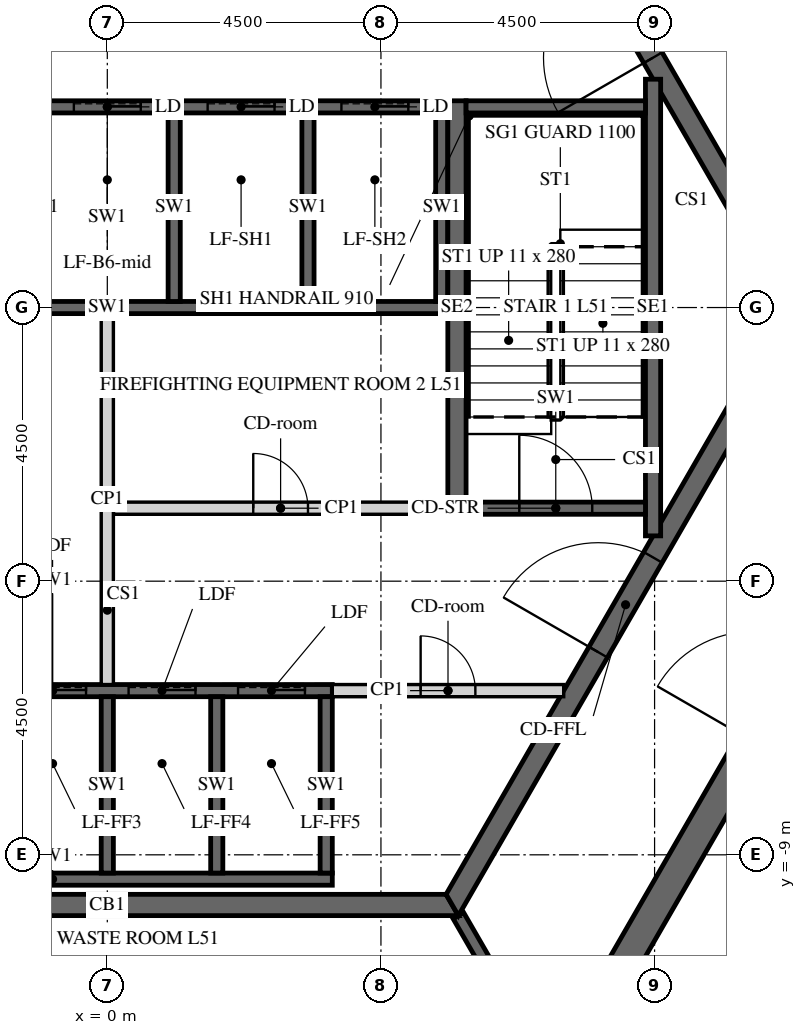
"""IFC4 building model, lengths in metres.
Left out: names, types, materials, properties, quantities, classifications, styles, units other than length and angle.
Written with IfcOpenShell. Run it as: python <this file> out.ifc"""

import sys

from ifc_helpers import new_model, si_unit, direction, frame, frame_2d, origin, place, context, subcontext, project, spatial, polyline, rectangle, outline, extrude, element, fill, save


model = new_model("IFC4")
c1 = context("Model", 3, precision=1e-05, world=origin(), true_north=direction((0.0, 1.0)))
c2 = subcontext(c1, "Body", "Model", "MODEL_VIEW")
j1 = project(units=[si_unit("LENGTHUNIT", "METRE"), si_unit("PLANEANGLEUNIT", "RADIAN")], contexts=[c1])
p1 = place(None, origin())
s1 = spatial("IfcSite", under=j1, at=p1, CompositionType="ELEMENT")
p2 = place(p1, origin())
s2 = spatial("IfcBuilding", under=s1, at=p2, CompositionType="ELEMENT")
p3 = place(p2, frame((0.0, 0.0, 215.1)))
s3 = spatial("IfcBuildingStorey", under=s2, at=p3, CompositionType="ELEMENT", Elevation=215.1)
p4 = place(p3, frame((7.361, -12.75, -0.15), z_axis=(0.0, 0.0, 1.0), x_axis=(0.50000571537, 0.866022103989, 0.0)))
e1 = element("IfcWall", 1, at=p4, inside=s3, PredefinedType="SHEAR", context=c2, shape_type="SweptSolid", body=[
    extrude(outline(polyline([(-0.144, -0.25), (14.867, -0.25), (14.578, 0.25), (0.144, 0.25), (-0.144, -0.25)])), origin(), (0.0, 0.0, 1.0), 3.9),
])
p5 = place(p4, frame((6.49, 0.0, 0.15)))
e2 = element("IfcOpeningElement", 2, at=p5, cuts=e1, PredefinedType="OPENING", context=c2, shape_type="SweptSolid", body=[
    extrude(rectangle(XDim=1.8, YDim=2.4, at=frame_2d((0.9, 1.2))), frame((0.0, 0.26, 0.0), z_axis=(0.0, -1.0, 0.0), x_axis=(1.0, 0.0, 0.0)), (0.0, 0.0, 1.0), 0.52),
])
p6 = place(p3, frame((14.722, 0.0, -0.15), z_axis=(0.0, 0.0, 1.0), x_axis=(-0.50000571537, 0.866022103989, 0.0)))
e3 = element("IfcWall", 3, at=p6, inside=s3, PredefinedType="SHEAR", context=c2, shape_type="SweptSolid", body=[
    extrude(outline(polyline([(-0.144, -0.25), (14.867, -0.25), (14.578, 0.25), (0.144, 0.25), (-0.144, -0.25)])), origin(), (0.0, 0.0, 1.0), 3.9),
])
p7 = place(p6, frame((6.432, 0.0, 0.15)))
e4 = element("IfcOpeningElement", 4, at=p7, cuts=e3, PredefinedType="OPENING", context=c2, shape_type="SweptSolid", body=[
    extrude(rectangle(XDim=1.8, YDim=2.4, at=frame_2d((0.9, 1.2))), frame((0.0, 0.26, 0.0), z_axis=(0.0, -1.0, 0.0), x_axis=(1.0, 0.0, 0.0)), (0.0, 0.0, 1.0), 0.52),
])
p8 = place(p3, frame((-5.673, -9.825, -0.15), z_axis=(0.0, 0.0, 1.0), x_axis=(1.0, 0.0, 0.0)))
e5 = element("IfcWall", 5, at=p8, inside=s3, PredefinedType="SHEAR", context=c2, shape_type="SweptSolid", body=[
    extrude(outline(polyline([(-0.101, -0.175), (11.446, -0.175), (11.244, 0.175), (0.101, 0.175), (-0.101, -0.175)])), origin(), (0.0, 0.0, 1.0), 3.9),
])
p9 = place(p3, frame((5.673, -9.825, -0.15), z_axis=(0.0, 0.0, 1.0), x_axis=(0.499995046907, 0.866028263435, 0.0)))
e6 = element("IfcWall", 6, at=p9, inside=s3, PredefinedType="SHEAR", context=c2, shape_type="SweptSolid", body=[
    extrude(outline(polyline([(-0.101, -0.175), (11.446, -0.175), (11.244, 0.175), (0.101, 0.175), (-0.101, -0.175)])), origin(), (0.0, 0.0, 1.0), 3.9),
])
p10 = place(p9, frame((4.801, 0.0, 0.15)))
e7 = element("IfcOpeningElement", 7, at=p10, cuts=e6, PredefinedType="OPENING", context=c2, shape_type="SweptSolid", body=[
    extrude(rectangle(XDim=1.8, YDim=2.4, at=frame_2d((0.9, 1.2))), frame((0.0, 0.185, 0.0), z_axis=(0.0, -1.0, 0.0), x_axis=(1.0, 0.0, 0.0)), (0.0, 0.0, 1.0), 0.37),
])
p11 = place(p3, frame((11.345, 0.0, -0.15), z_axis=(0.0, 0.0, 1.0), x_axis=(-0.499995046907, 0.866028263435, 0.0)))
e8 = element("IfcWall", 8, at=p11, inside=s3, PredefinedType="SHEAR", context=c2, shape_type="SweptSolid", body=[
    extrude(outline(polyline([(-0.101, -0.175), (11.446, -0.175), (11.244, 0.175), (0.101, 0.175), (-0.101, -0.175)])), origin(), (0.0, 0.0, 1.0), 3.9),
])
p12 = place(p11, frame((4.744, 0.0, 0.15)))
e9 = element("IfcOpeningElement", 9, at=p12, cuts=e8, PredefinedType="OPENING", context=c2, shape_type="SweptSolid", body=[
    extrude(rectangle(XDim=1.8, YDim=2.4, at=frame_2d((0.9, 1.2))), frame((0.0, 0.185, 0.0), z_axis=(0.0, -1.0, 0.0), x_axis=(1.0, 0.0, 0.0)), (0.0, 0.0, 1.0), 0.37),
])
p13 = place(p3, frame((-5.6, 3.3, -0.25), z_axis=(0.0, 0.0, 1.0), x_axis=(1.0, 0.0, 0.0)))
e10 = element("IfcWall", 10, at=p13, inside=s3, PredefinedType="SHEAR", context=c2, shape_type="SweptSolid", body=[
    extrude(rectangle(XDim=11.2, YDim=0.2, at=frame_2d((5.6, 0.0))), origin(), (0.0, 0.0, 1.0), 3.9),
])
p14 = place(p13, frame((0.65, 0.0, 0.25)))
e11 = element("IfcOpeningElement", 11, at=p14, cuts=e10, PredefinedType="OPENING", context=c2, shape_type="SweptSolid", body=[
    extrude(rectangle(XDim=1.1, YDim=2.1, at=frame_2d((0.55, 1.05))), frame((0.0, 0.11, 0.0), z_axis=(0.0, -1.0, 0.0), x_axis=(1.0, 0.0, 0.0)), (0.0, 0.0, 1.0), 0.22),
])
p15 = place(p13, frame((2.85, 0.0, 0.25)))
e12 = element("IfcOpeningElement", 12, at=p15, cuts=e10, PredefinedType="OPENING", context=c2, shape_type="SweptSolid", body=[
    extrude(rectangle(XDim=1.1, YDim=2.1, at=frame_2d((0.55, 1.05))), frame((0.0, 0.11, 0.0), z_axis=(0.0, -1.0, 0.0), x_axis=(1.0, 0.0, 0.0)), (0.0, 0.0, 1.0), 0.22),
])
p16 = place(p13, frame((5.05, 0.0, 0.25)))
e13 = element("IfcOpeningElement", 13, at=p16, cuts=e10, PredefinedType="OPENING", context=c2, shape_type="SweptSolid", body=[
    extrude(rectangle(XDim=1.1, YDim=2.1, at=frame_2d((0.55, 1.05))), frame((0.0, 0.11, 0.0), z_axis=(0.0, -1.0, 0.0), x_axis=(1.0, 0.0, 0.0)), (0.0, 0.0, 1.0), 0.22),
])
p17 = place(p13, frame((7.25, 0.0, 0.25)))
e14 = element("IfcOpeningElement", 14, at=p17, cuts=e10, PredefinedType="OPENING", context=c2, shape_type="SweptSolid", body=[
    extrude(rectangle(XDim=1.1, YDim=2.1, at=frame_2d((0.55, 1.05))), frame((0.0, 0.11, 0.0), z_axis=(0.0, -1.0, 0.0), x_axis=(1.0, 0.0, 0.0)), (0.0, 0.0, 1.0), 0.22),
])
p18 = place(p13, frame((9.45, 0.0, 0.25)))
e15 = element("IfcOpeningElement", 15, at=p18, cuts=e10, PredefinedType="OPENING", context=c2, shape_type="SweptSolid", body=[
    extrude(rectangle(XDim=1.1, YDim=2.1, at=frame_2d((0.55, 1.05))), frame((0.0, 0.11, 0.0), z_axis=(0.0, -1.0, 0.0), x_axis=(1.0, 0.0, 0.0)), (0.0, 0.0, 1.0), 0.22),
])
p19 = place(p3, frame((-5.6, 0.0, -0.25), z_axis=(0.0, 0.0, 1.0), x_axis=(1.0, 0.0, 0.0)))
e16 = element("IfcWall", 16, at=p19, inside=s3, PredefinedType="SHEAR", context=c2, shape_type="SweptSolid", body=[
    extrude(rectangle(XDim=11.2, YDim=0.2, at=frame_2d((5.6, 0.0))), origin(), (0.0, 0.0, 1.0), 3.9),
])
for number, where, z_axis, x_axis in (
    (17, (1.1, 0.1, -0.25), (0.0, 0.0, 1.0), (0.0, 1.0, 0.0)),
    (18, (3.3, 0.1, -0.25), (0.0, 0.0, 1.0), (0.0, 1.0, 0.0)),
    (19, (5.5, 0.1, -0.25), (0.0, 0.0, 1.0), (0.0, 1.0, 0.0)),
):
    element("IfcWall", number, at=place(p3, frame(where, z_axis=z_axis, x_axis=x_axis)), inside=s3, PredefinedType="SHEAR", context=c2, shape_type="SweptSolid", body=[
        extrude(rectangle(XDim=3.1, YDim=0.2, at=frame_2d((1.55, 0.0))), origin(), (0.0, 0.0, 1.0), 3.9),
    ])
p20 = place(p3, frame((-5.5, -6.3, -0.25), z_axis=(0.0, 0.0, 1.0), x_axis=(1.0, 0.0, 0.0)))
e20 = element("IfcWall", 20, at=p20, inside=s3, PredefinedType="SHEAR", context=c2, shape_type="SweptSolid", body=[
    extrude(rectangle(XDim=9.2, YDim=0.2, at=frame_2d((4.6, 0.0))), origin(), (0.0, 0.0, 1.0), 3.9),
])
p21 = place(p20, frame((0.45, 0.0, 0.25)))
e21 = element("IfcOpeningElement", 21, at=p21, cuts=e20, PredefinedType="OPENING", context=c2, shape_type="SweptSolid", body=[
    extrude(rectangle(XDim=1.1, YDim=2.1, at=frame_2d((0.55, 1.05))), frame((0.0, 0.11, 0.0), z_axis=(0.0, -1.0, 0.0), x_axis=(1.0, 0.0, 0.0)), (0.0, 0.0, 1.0), 0.22),
])
p22 = place(p20, frame((2.25, 0.0, 0.25)))
e22 = element("IfcOpeningElement", 22, at=p22, cuts=e20, PredefinedType="OPENING", context=c2, shape_type="SweptSolid", body=[
    extrude(rectangle(XDim=1.1, YDim=2.1, at=frame_2d((0.55, 1.05))), frame((0.0, 0.11, 0.0), z_axis=(0.0, -1.0, 0.0), x_axis=(1.0, 0.0, 0.0)), (0.0, 0.0, 1.0), 0.22),
])
p23 = place(p20, frame((4.05, 0.0, 0.25)))
e23 = element("IfcOpeningElement", 23, at=p23, cuts=e20, PredefinedType="OPENING", context=c2, shape_type="SweptSolid", body=[
    extrude(rectangle(XDim=1.1, YDim=2.1, at=frame_2d((0.55, 1.05))), frame((0.0, 0.11, 0.0), z_axis=(0.0, -1.0, 0.0), x_axis=(1.0, 0.0, 0.0)), (0.0, 0.0, 1.0), 0.22),
])
p24 = place(p20, frame((5.85, 0.0, 0.25)))
e24 = element("IfcOpeningElement", 24, at=p24, cuts=e20, PredefinedType="OPENING", context=c2, shape_type="SweptSolid", body=[
    extrude(rectangle(XDim=1.1, YDim=2.1, at=frame_2d((0.55, 1.05))), frame((0.0, 0.11, 0.0), z_axis=(0.0, -1.0, 0.0), x_axis=(1.0, 0.0, 0.0)), (0.0, 0.0, 1.0), 0.22),
])
p25 = place(p20, frame((7.65, 0.0, 0.25)))
e25 = element("IfcOpeningElement", 25, at=p25, cuts=e20, PredefinedType="OPENING", context=c2, shape_type="SweptSolid", body=[
    extrude(rectangle(XDim=1.1, YDim=2.1, at=frame_2d((0.55, 1.05))), frame((0.0, 0.11, 0.0), z_axis=(0.0, -1.0, 0.0), x_axis=(1.0, 0.0, 0.0)), (0.0, 0.0, 1.0), 0.22),
])
p26 = place(p3, frame((-5.5, -9.4, -0.25), z_axis=(0.0, 0.0, 1.0), x_axis=(1.0, 0.0, 0.0)))
e26 = element("IfcWall", 26, at=p26, inside=s3, PredefinedType="SHEAR", context=c2, shape_type="SweptSolid", body=[
    extrude(rectangle(XDim=9.2, YDim=0.2, at=frame_2d((4.6, 0.0))), origin(), (0.0, 0.0, 1.0), 3.9),
])
for number, where, z_axis, x_axis in (
    (27, (0.0, -9.3, -0.25), (0.0, 0.0, 1.0), (0.0, 1.0, 0.0)),
    (28, (1.8, -9.3, -0.25), (0.0, 0.0, 1.0), (0.0, 1.0, 0.0)),
    (29, (3.6, -9.3, -0.25), (0.0, 0.0, 1.0), (0.0, 1.0, 0.0)),
):
    element("IfcWall", number, at=place(p3, frame(where, z_axis=z_axis, x_axis=x_axis)), inside=s3, PredefinedType="SHEAR", context=c2, shape_type="SweptSolid", body=[
        extrude(rectangle(XDim=2.9, YDim=0.2, at=frame_2d((1.45, 0.0))), origin(), (0.0, 0.0, 1.0), 3.9),
    ])
p27 = place(p3, frame((0.1, -3.3, 0.0), z_axis=(0.0, 0.0, 1.0), x_axis=(1.0, 0.0, 0.0)))
e30 = element("IfcWall", 30, at=p27, inside=s3, PredefinedType="PARTITIONING", context=c2, shape_type="SweptSolid", body=[
    extrude(rectangle(XDim=5.5, YDim=0.2, at=frame_2d((2.75, 0.0))), origin(), (0.0, 0.0, 1.0), 3.65),
])
p28 = place(p27, frame((2.3, 0.0, 0.0)))
e31 = element("IfcOpeningElement", 31, at=p28, cuts=e30, PredefinedType="OPENING", context=c2, shape_type="SweptSolid", body=[
    extrude(rectangle(XDim=0.9, YDim=2.1, at=frame_2d((0.45, 1.05))), frame((0.0, 0.11, 0.0), z_axis=(0.0, -1.0, 0.0), x_axis=(1.0, 0.0, 0.0)), (0.0, 0.0, 1.0), 0.22),
])
p29 = place(p3, frame((0.0, -6.2, 0.0), z_axis=(0.0, 0.0, 1.0), x_axis=(0.0, 1.0, 0.0)))
e32 = element("IfcWall", 32, at=p29, inside=s3, PredefinedType="PARTITIONING", context=c2, shape_type="SweptSolid", body=[
    extrude(rectangle(XDim=6.1, YDim=0.2, at=frame_2d((3.05, 0.0))), origin(), (0.0, 0.0, 1.0), 3.65),
])
p30 = place(p3, frame((3.7, -6.3, 0.0), z_axis=(0.0, 0.0, 1.0), x_axis=(1.0, 0.0, 0.0)))
e33 = element("IfcWall", 33, at=p30, inside=s3, PredefinedType="PARTITIONING", context=c2, shape_type="SweptSolid", body=[
    extrude(rectangle(XDim=3.806, YDim=0.2, at=frame_2d((1.903, 0.0))), origin(), (0.0, 0.0, 1.0), 3.65),
])
p31 = place(p30, frame((1.453, 0.0, 0.0)))
e34 = element("IfcOpeningElement", 34, at=p31, cuts=e33, PredefinedType="OPENING", context=c2, shape_type="SweptSolid", body=[
    extrude(rectangle(XDim=0.9, YDim=2.1, at=frame_2d((0.45, 1.05))), frame((0.0, 0.11, 0.0), z_axis=(0.0, -1.0, 0.0), x_axis=(1.0, 0.0, 0.0)), (0.0, 0.0, 1.0), 0.22),
])
p32 = place(p3, frame((5.773, -10.0, -0.15), z_axis=(0.0, 0.0, 1.0), x_axis=(0.499995765644, -0.866027848477, 0.0)))
e35 = element("IfcWall", 35, at=p32, inside=s3, PredefinedType="SHEAR", context=c2, shape_type="SweptSolid", body=[
    extrude(rectangle(XDim=2.887, YDim=0.2, at=frame_2d((1.443, 0.0))), origin(), (0.0, 0.0, 1.0), 3.9),
])
p33 = place(p3, frame((5.75, -3.4, -0.25), z_axis=(0.0, 0.0, 1.0), x_axis=(0.0, 1.0, 0.0)))
e36 = element("IfcWall", 36, at=p33, inside=s3, PredefinedType="SHEAR", context=c2, shape_type="SweptSolid", body=[
    extrude(rectangle(XDim=6.8, YDim=0.3, at=frame_2d((3.4, 0.0))), origin(), (0.0, 0.0, 1.0), 3.9),
])
p34 = place(p3, frame((8.975, -3.755, -0.25), z_axis=(0.0, 0.0, 1.0), x_axis=(0.0, 1.0, 0.0)))
e37 = element("IfcWall", 37, at=p34, inside=s3, PredefinedType="SHEAR", context=c2, shape_type="SweptSolid", body=[
    extrude(rectangle(XDim=7.51, YDim=0.25, at=frame_2d((3.755, 0.0))), origin(), (0.0, 0.0, 1.0), 3.9),
])
p35 = place(p3, frame((5.9, 3.3, -0.25), z_axis=(0.0, 0.0, 1.0), x_axis=(1.0, 0.0, 0.0)))
e38 = element("IfcWall", 38, at=p35, inside=s3, PredefinedType="SHEAR", context=c2, shape_type="SweptSolid", body=[
    extrude(rectangle(XDim=2.95, YDim=0.2, at=frame_2d((1.475, 0.0))), origin(), (0.0, 0.0, 1.0), 3.9),
])
p36 = place(p3, frame((5.9, -3.3, -0.25), z_axis=(0.0, 0.0, 1.0), x_axis=(1.0, 0.0, 0.0)))
e39 = element("IfcWall", 39, at=p36, inside=s3, PredefinedType="SHEAR", context=c2, shape_type="SweptSolid", body=[
    extrude(rectangle(XDim=2.95, YDim=0.2, at=frame_2d((1.475, 0.0))), origin(), (0.0, 0.0, 1.0), 3.9),
])
p37 = place(p36, frame((0.875, 0.0, 0.25)))
e40 = element("IfcOpeningElement", 40, at=p37, cuts=e39, PredefinedType="OPENING", context=c2, shape_type="SweptSolid", body=[
    extrude(rectangle(XDim=1.2, YDim=2.4, at=frame_2d((0.6, 1.2))), frame((0.0, 0.11, 0.0), z_axis=(0.0, -1.0, 0.0), x_axis=(1.0, 0.0, 0.0)), (0.0, 0.0, 1.0), 0.22),
])
p38 = place(p3, frame((9.772, -12.675, 0.0), z_axis=(0.0, 0.0, 1.0), x_axis=(0.499996322767, 0.866027526826, 0.0)))
e41 = element("IfcWall", 41, at=p38, inside=s3, PredefinedType="PARTITIONING", context=c2, shape_type="SweptSolid", body=[
    extrude(rectangle(XDim=14.636, YDim=0.15, at=frame_2d((7.318, 0.0))), origin(), (0.0, 0.0, 1.0), 2.988),
])
p39 = place(p38, frame((5.361, 0.0, 0.0)))
e42 = element("IfcOpeningElement", 42, at=p39, cuts=e41, PredefinedType="OPENING", context=c2, shape_type="SweptSolid", body=[
    extrude(rectangle(XDim=1.0, YDim=2.1, at=frame_2d((0.5, 1.05))), frame((0.0, 0.085, 0.0), z_axis=(0.0, -1.0, 0.0), x_axis=(1.0, 0.0, 0.0)), (0.0, 0.0, 1.0), 0.17),
])
p40 = place(p38, frame((10.309, 0.0, 0.0)))
e43 = element("IfcOpeningElement", 43, at=p40, cuts=e41, PredefinedType="OPENING", context=c2, shape_type="SweptSolid", body=[
    extrude(rectangle(XDim=1.0, YDim=2.1, at=frame_2d((0.5, 1.05))), frame((0.0, 0.085, 0.0), z_axis=(0.0, -1.0, 0.0), x_axis=(1.0, 0.0, 0.0)), (0.0, 0.0, 1.0), 0.17),
])
p41 = place(p38, frame((13.278, 0.0, 0.0)))
e44 = element("IfcOpeningElement", 44, at=p41, cuts=e41, PredefinedType="OPENING", context=c2, shape_type="SweptSolid", body=[
    extrude(rectangle(XDim=1.0, YDim=2.1, at=frame_2d((0.5, 1.05))), frame((0.0, 0.085, 0.0), z_axis=(0.0, -1.0, 0.0), x_axis=(1.0, 0.0, 0.0)), (0.0, 0.0, 1.0), 0.17),
])
p42 = place(p3, frame((17.046, 0.075, 0.0), z_axis=(0.0, 0.0, 1.0), x_axis=(-0.500008833422, 0.866020303746, 0.0)))
e45 = element("IfcWall", 45, at=p42, inside=s3, PredefinedType="PARTITIONING", context=c2, shape_type="SweptSolid", body=[
    extrude(rectangle(XDim=14.636, YDim=0.15, at=frame_2d((7.318, 0.0))), origin(), (0.0, 0.0, 1.0), 2.988),
])
p43 = place(p42, frame((9.07, 0.0, 0.0)))
e46 = element("IfcOpeningElement", 46, at=p43, cuts=e45, PredefinedType="OPENING", context=c2, shape_type="SweptSolid", body=[
    extrude(rectangle(XDim=1.0, YDim=2.1, at=frame_2d((0.5, 1.05))), frame((0.0, 0.085, 0.0), z_axis=(0.0, -1.0, 0.0), x_axis=(1.0, 0.0, 0.0)), (0.0, 0.0, 1.0), 0.17),
])
p44 = place(p12, origin())
e47 = element("IfcDoor", 47, at=p44, inside=s3, OperationType="DOUBLE_DOOR_SINGLE_SWING", PredefinedType="DOOR", context=c2, shape_type="SweptSolid", body=[
    extrude(rectangle(XDim=1.8, YDim=2.4, at=frame_2d((0.9, 1.2))), frame((0.0, 0.025, 0.0), z_axis=(0.0, -1.0, 0.0), x_axis=(1.0, 0.0, 0.0)), (0.0, 0.0, 1.0), 0.05),
])
fill(e9, e47)
p45 = place(p10, origin())
e48 = element("IfcDoor", 48, at=p45, inside=s3, OperationType="DOUBLE_DOOR_SINGLE_SWING", PredefinedType="DOOR", context=c2, shape_type="SweptSolid", body=[
    extrude(rectangle(XDim=1.8, YDim=2.4, at=frame_2d((0.9, 1.2))), frame((0.0, 0.025, 0.0), z_axis=(0.0, -1.0, 0.0), x_axis=(1.0, 0.0, 0.0)), (0.0, 0.0, 1.0), 0.05),
])
fill(e7, e48)
p46 = place(p28, origin())
e49 = element("IfcDoor", 49, at=p46, inside=s3, OperationType="SINGLE_SWING_LEFT", PredefinedType="DOOR", context=c2, shape_type="SweptSolid", body=[
    extrude(rectangle(XDim=0.9, YDim=2.1, at=frame_2d((0.45, 1.05))), frame((0.0, 0.025, 0.0), z_axis=(0.0, -1.0, 0.0), x_axis=(1.0, 0.0, 0.0)), (0.0, 0.0, 1.0), 0.05),
])
fill(e31, e49)
p47 = place(p31, origin())
e50 = element("IfcDoor", 50, at=p47, inside=s3, OperationType="SINGLE_SWING_LEFT", PredefinedType="DOOR", context=c2, shape_type="SweptSolid", body=[
    extrude(rectangle(XDim=0.9, YDim=2.1, at=frame_2d((0.45, 1.05))), frame((0.0, 0.025, 0.0), z_axis=(0.0, -1.0, 0.0), x_axis=(1.0, 0.0, 0.0)), (0.0, 0.0, 1.0), 0.05),
])
fill(e34, e50)
p48 = place(p37, origin())
e51 = element("IfcDoor", 51, at=p48, inside=s3, OperationType="SINGLE_SWING_LEFT", PredefinedType="DOOR", context=c2, shape_type="SweptSolid", body=[
    extrude(rectangle(XDim=1.2, YDim=2.4, at=frame_2d((0.6, 1.2))), frame((0.0, 0.025, 0.0), z_axis=(0.0, -1.0, 0.0), x_axis=(1.0, 0.0, 0.0)), (0.0, 0.0, 1.0), 0.05),
])
fill(e40, e51)
p49 = place(p16, origin())
e52 = element("IfcDoor", 52, at=p49, inside=s3, OperationType="SLIDING_TO_LEFT", PredefinedType="DOOR", context=c2, shape_type="SweptSolid", body=[
    extrude(rectangle(XDim=1.1, YDim=2.1, at=frame_2d((0.55, 1.05))), frame((0.0, 0.025, 0.0), z_axis=(0.0, -1.0, 0.0), x_axis=(1.0, 0.0, 0.0)), (0.0, 0.0, 1.0), 0.05),
])
fill(e13, e52)
p50 = place(p17, origin())
e53 = element("IfcDoor", 53, at=p50, inside=s3, OperationType="SLIDING_TO_LEFT", PredefinedType="DOOR", context=c2, shape_type="SweptSolid", body=[
    extrude(rectangle(XDim=1.1, YDim=2.1, at=frame_2d((0.55, 1.05))), frame((0.0, 0.025, 0.0), z_axis=(0.0, -1.0, 0.0), x_axis=(1.0, 0.0, 0.0)), (0.0, 0.0, 1.0), 0.05),
])
fill(e14, e53)
p51 = place(p18, origin())
e54 = element("IfcDoor", 54, at=p51, inside=s3, OperationType="SLIDING_TO_LEFT", PredefinedType="DOOR", context=c2, shape_type="SweptSolid", body=[
    extrude(rectangle(XDim=1.1, YDim=2.1, at=frame_2d((0.55, 1.05))), frame((0.0, 0.025, 0.0), z_axis=(0.0, -1.0, 0.0), x_axis=(1.0, 0.0, 0.0)), (0.0, 0.0, 1.0), 0.05),
])
fill(e15, e54)
p52 = place(p23, origin())
e55 = element("IfcDoor", 55, at=p52, inside=s3, OperationType="SLIDING_TO_LEFT", PredefinedType="DOOR", context=c2, shape_type="SweptSolid", body=[
    extrude(rectangle(XDim=1.1, YDim=2.1, at=frame_2d((0.55, 1.05))), frame((0.0, 0.025, 0.0), z_axis=(0.0, -1.0, 0.0), x_axis=(1.0, 0.0, 0.0)), (0.0, 0.0, 1.0), 0.05),
])
fill(e23, e55)
p53 = place(p24, origin())
e56 = element("IfcDoor", 56, at=p53, inside=s3, OperationType="SLIDING_TO_LEFT", PredefinedType="DOOR", context=c2, shape_type="SweptSolid", body=[
    extrude(rectangle(XDim=1.1, YDim=2.1, at=frame_2d((0.55, 1.05))), frame((0.0, 0.025, 0.0), z_axis=(0.0, -1.0, 0.0), x_axis=(1.0, 0.0, 0.0)), (0.0, 0.0, 1.0), 0.05),
])
fill(e24, e56)
p54 = place(p25, origin())
e57 = element("IfcDoor", 57, at=p54, inside=s3, OperationType="SLIDING_TO_LEFT", PredefinedType="DOOR", context=c2, shape_type="SweptSolid", body=[
    extrude(rectangle(XDim=1.1, YDim=2.1, at=frame_2d((0.55, 1.05))), frame((0.0, 0.025, 0.0), z_axis=(0.0, -1.0, 0.0), x_axis=(1.0, 0.0, 0.0)), (0.0, 0.0, 1.0), 0.05),
])
fill(e25, e57)
save(model, sys.argv[1])
